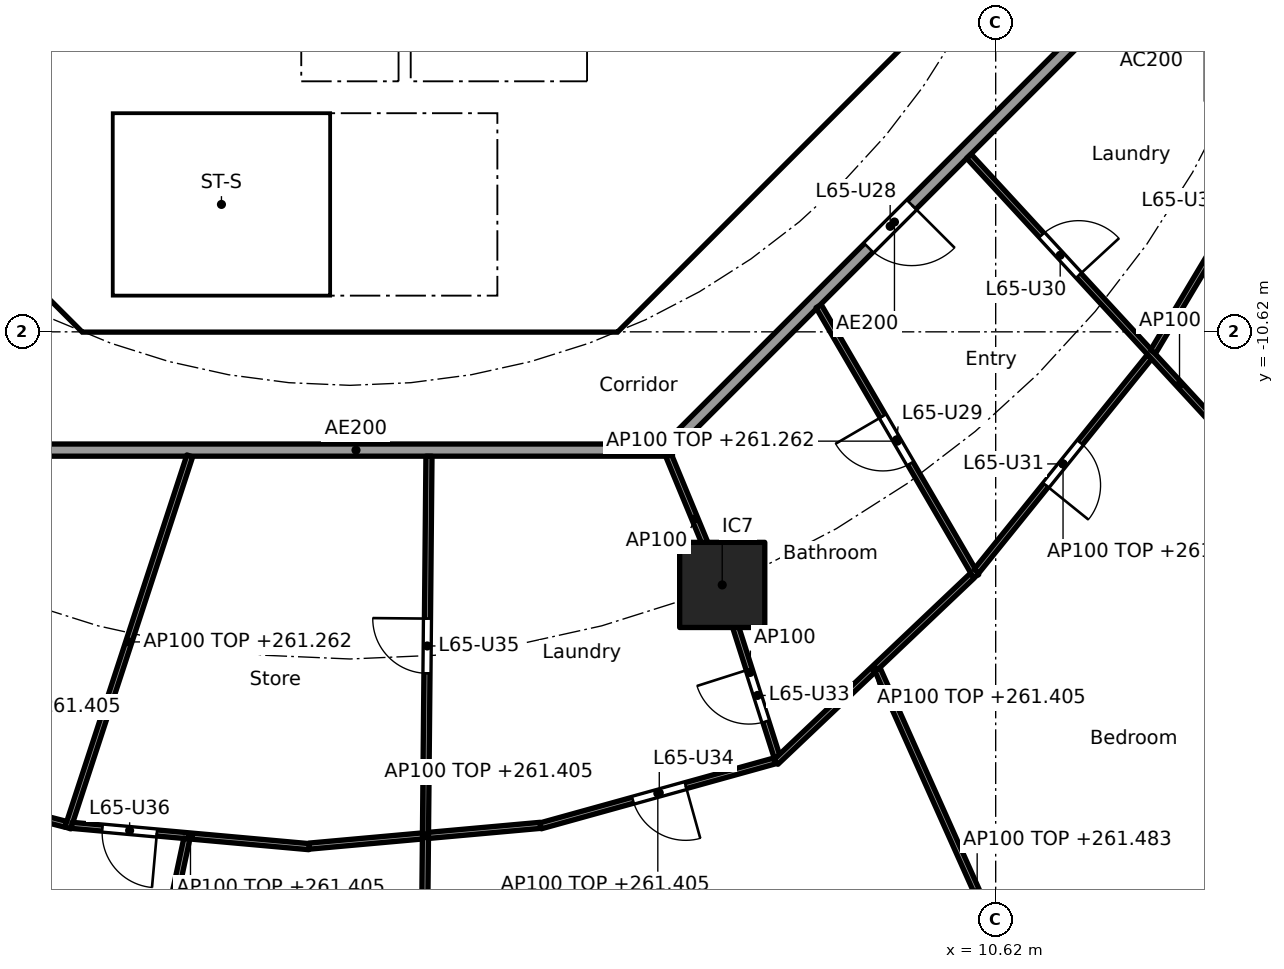
"""IFC4 building model, lengths in metres.
Left out: names, types, materials, properties, quantities, classifications, styles, units other than length and angle.
Written with IfcOpenShell. Run it as: python <this file> out.ifc"""

import sys

from ifc_helpers import new_model, si_unit, direction, frame, frame_2d, origin, origin_2d, place, context, subcontext, project, spatial, polyline, rectangle, outline, extrude, element, fill, save


model = new_model("IFC4")
c1 = context("Model", 3, precision=1e-05, world=origin(), true_north=direction((0.0, 1.0)))
c2 = subcontext(c1, "Body", "Model", "MODEL_VIEW")
j1 = project(units=[si_unit("LENGTHUNIT", "METRE"), si_unit("PLANEANGLEUNIT", "RADIAN")], contexts=[c1])
p1 = place(None, origin())
s1 = spatial("IfcSite", under=j1, at=p1, CompositionType="ELEMENT")
p2 = place(p1, origin())
s2 = spatial("IfcBuilding", under=s1, at=p2, CompositionType="ELEMENT")
p3 = place(p2, frame((0.0, 0.0, 258.5)))
s3 = spatial("IfcBuildingStorey", under=s2, at=p3, CompositionType="ELEMENT", Elevation=258.5)
p4 = place(p3, frame((6.123, -14.782, 0.0), z_axis=(0.0, 0.0, 1.0), x_axis=(1.0, 0.0, 0.0)))
e1 = element("IfcColumn", 1, at=p4, inside=s3, PredefinedType="COLUMN", context=c2, shape_type="SweptSolid", body=[
    extrude(rectangle(XDim=1.4, YDim=1.4, at=origin_2d()), origin(), (0.0, 0.0, 1.0), 3.7),
])
p5 = place(p3, frame((-9.988, -4.613, 0.0), z_axis=(0.0, 0.0, 1.0), x_axis=(0.707106781187, -0.707106781187, 0.0)))
e2 = element("IfcWall", 2, at=p5, inside=s3, PredefinedType="SHEAR", context=c2, shape_type="SweptSolid", body=[
    extrude(rectangle(XDim=7.602, YDim=0.6, at=frame_2d((3.801, 0.0))), origin(), (0.0, 0.0, 1.0), 3.44),
])
p6 = place(p5, frame((6.151, 0.0, 0.0)))
e3 = element("IfcOpeningElement", 3, at=p6, cuts=e2, PredefinedType="OPENING", context=c2, shape_type="SweptSolid", body=[
    extrude(rectangle(XDim=1.1, YDim=2.1, at=frame_2d((0.55, 1.05))), frame((0.0, 0.31, 0.0), z_axis=(0.0, -1.0, 0.0), x_axis=(1.0, 0.0, 0.0)), (0.0, 0.0, 1.0), 0.62),
])
p7 = place(p3, frame((4.613, -9.988, 0.0), z_axis=(0.0, 0.0, 1.0), x_axis=(0.707106781187, 0.707106781187, 0.0)))
e4 = element("IfcWall", 4, at=p7, inside=s3, PredefinedType="SHEAR", context=c2, shape_type="SweptSolid", body=[
    extrude(rectangle(XDim=7.602, YDim=0.6, at=frame_2d((3.801, 0.0))), origin(), (0.0, 0.0, 1.0), 3.44),
])
p8 = place(p7, frame((3.201, 0.0, 0.0)))
e5 = element("IfcOpeningElement", 5, at=p8, cuts=e4, PredefinedType="OPENING", context=c2, shape_type="SweptSolid", body=[
    extrude(rectangle(XDim=1.2, YDim=2.1, at=frame_2d((0.6, 1.05))), frame((0.0, 0.31, 0.0), z_axis=(0.0, -1.0, 0.0), x_axis=(1.0, 0.0, 0.0)), (0.0, 0.0, 1.0), 0.62),
])
p9 = place(p3, frame((4.0, -10.025, 0.0), z_axis=(0.0, 0.0, 1.0), x_axis=(0.0, 1.0, 0.0)))
e6 = element("IfcWall", 6, at=p9, inside=s3, PredefinedType="SOLIDWALL", context=c2, shape_type="SweptSolid", body=[
    extrude(rectangle(XDim=3.0, YDim=0.2, at=frame_2d((1.5, 0.0))), origin(), (0.0, 0.0, 1.0), 3.44),
])
p10 = place(p9, frame((0.975, 0.0, 0.0)))
e7 = element("IfcOpeningElement", 7, at=p10, cuts=e6, PredefinedType="OPENING", context=c2, shape_type="SweptSolid", body=[
    extrude(rectangle(XDim=1.1, YDim=2.1, at=frame_2d((0.55, 1.05))), frame((0.0, 0.11, 0.0), z_axis=(0.0, -1.0, 0.0), x_axis=(1.0, 0.0, 0.0)), (0.0, 0.0, 1.0), 0.22),
])
p11 = place(p3, frame((4.0, -6.5, 0.0), z_axis=(0.0, 0.0, 1.0), x_axis=(0.0, 1.0, 0.0)))
e8 = element("IfcWall", 8, at=p11, inside=s3, PredefinedType="SOLIDWALL", context=c2, shape_type="SweptSolid", body=[
    extrude(rectangle(XDim=2.2, YDim=0.2, at=frame_2d((1.1, 0.0))), origin(), (0.0, 0.0, 1.0), 3.44),
])
p12 = place(p11, frame((0.55, 0.0, 0.0)))
e9 = element("IfcOpeningElement", 9, at=p12, cuts=e8, PredefinedType="OPENING", context=c2, shape_type="SweptSolid", body=[
    extrude(rectangle(XDim=1.1, YDim=2.1, at=frame_2d((0.55, 1.05))), frame((0.0, 0.11, 0.0), z_axis=(0.0, -1.0, 0.0), x_axis=(1.0, 0.0, 0.0)), (0.0, 0.0, 1.0), 0.22),
])
p13 = place(p3, frame((-4.0, -6.5, 0.0), z_axis=(0.0, 0.0, 1.0), x_axis=(0.0, 1.0, 0.0)))
e10 = element("IfcWall", 10, at=p13, inside=s3, PredefinedType="SOLIDWALL", context=c2, shape_type="SweptSolid", body=[
    extrude(rectangle(XDim=2.2, YDim=0.2, at=frame_2d((1.1, 0.0))), origin(), (0.0, 0.0, 1.0), 3.44),
])
p14 = place(p13, frame((0.65, 0.0, 0.0)))
e11 = element("IfcOpeningElement", 11, at=p14, cuts=e10, PredefinedType="OPENING", context=c2, shape_type="SweptSolid", body=[
    extrude(rectangle(XDim=0.9, YDim=2.1, at=frame_2d((0.45, 1.05))), frame((0.0, 0.11, 0.0), z_axis=(0.0, -1.0, 0.0), x_axis=(1.0, 0.0, 0.0)), (0.0, 0.0, 1.0), 0.22),
])
p15 = place(p3, origin())
e12 = element("IfcWall", 12, at=p15, inside=s3, PredefinedType="SHEAR", context=c2, shape_type="SweptSolid", body=[
    extrude(outline(polyline([(-4.152, -10.025), (4.152, -10.025), (4.401, -9.776), (4.825, -10.2), (4.401, -10.625), (-4.401, -10.625), (-4.825, -10.2), (-4.401, -9.776), (-4.152, -10.025)])), origin(), (0.0, 0.0, 1.0), 3.44),
])
for number, where, z_axis, x_axis in (
    (13, (-0.9, -6.5, 0.0), (0.0, 0.0, 1.0), (0.0, 1.0, 0.0)),
    (14, (0.9, -6.5, 0.0), (0.0, 0.0, 1.0), (0.0, 1.0, 0.0)),
):
    element("IfcWall", number, at=place(p3, frame(where, z_axis=z_axis, x_axis=x_axis)), inside=s3, PredefinedType="SOLIDWALL", context=c2, shape_type="SweptSolid", body=[
        extrude(rectangle(XDim=2.2, YDim=0.2, at=frame_2d((1.1, 0.0))), origin(), (0.0, 0.0, 1.0), 3.44),
    ])
p16 = place(p3, origin())
e15 = element("IfcWall", 15, at=p16, inside=s3, PredefinedType="SOLIDWALL", context=c2, shape_type="SweptSolid", body=[
    extrude(outline(polyline([(-3.9, -10.025), (-4.1, -10.025), (-4.1, -7.025), (-3.9, -7.025), (-3.9, -10.025)])), origin(), (0.0, 0.0, 1.0), 3.44),
])
p17 = place(p3, origin())
e16 = element("IfcWall", 16, at=p17, inside=s3, PredefinedType="SOLIDWALL", context=c2, shape_type="SweptSolid", body=[
    extrude(outline(polyline([(4.1, -7.025), (-4.1, -7.025), (-4.1, -6.5), (4.1, -6.5), (4.1, -7.025)])), origin(), (0.0, 0.0, 1.0), 3.44),
])
p18 = place(p3, frame((12.657, -5.243, 0.0), z_axis=(0.0, 0.0, 1.0), x_axis=(0.92383017907, -0.382802560388, 0.0)))
e17 = element("IfcWall", 17, at=p18, inside=s3, PredefinedType="PARTITIONING", context=c2, shape_type="SweptSolid", body=[
    extrude(rectangle(XDim=2.2, YDim=0.2, at=frame_2d((1.1, 0.0))), origin(), (0.0, 0.0, 1.0), 3.44),
])
p19 = place(p3, frame((-5.104, -12.565, 0.0), z_axis=(0.0, 0.0, 1.0), x_axis=(1.0, 0.0, 0.0)))
e18 = element("IfcWall", 18, at=p19, inside=s3, PredefinedType="PARTITIONING", context=c2, shape_type="SweptSolid", body=[
    extrude(rectangle(XDim=10.409, YDim=0.2, at=frame_2d((5.205, 0.0))), origin(), (0.0, 0.0, 1.0), 3.44),
])
p20 = place(p3, frame((5.275, -12.494, 0.0), z_axis=(0.0, 0.0, 1.0), x_axis=(0.707106781187, 0.707106781187, 0.0)))
e19 = element("IfcWall", 19, at=p20, inside=s3, PredefinedType="PARTITIONING", context=c2, shape_type="SweptSolid", body=[
    extrude(rectangle(XDim=10.409, YDim=0.2, at=frame_2d((5.205, 0.0))), origin(), (0.0, 0.0, 1.0), 3.44),
])
p21 = place(p20, frame((4.604, 0.0, 0.0)))
e20 = element("IfcOpeningElement", 20, at=p21, cuts=e19, PredefinedType="OPENING", context=c2, shape_type="SweptSolid", body=[
    extrude(rectangle(XDim=1.0, YDim=2.1, at=frame_2d((0.5, 1.05))), frame((0.0, 0.11, 0.0), z_axis=(0.0, -1.0, 0.0), x_axis=(1.0, 0.0, 0.0)), (0.0, 0.0, 1.0), 0.22),
])
p22 = place(p3, frame((-8.03, -17.854, 0.0), z_axis=(0.0, 0.0, 1.0), x_axis=(0.968441967324, -0.249239154077, 0.0)))
e21 = element("IfcWall", 21, at=p22, inside=s3, PredefinedType="PARTITIONING", context=c2, shape_type="SweptSolid", body=[
    extrude(rectangle(XDim=3.468, YDim=0.1, at=frame_2d((1.734, 0.0))), origin(), (0.0, 0.0, 1.0), 2.905),
])
p23 = place(p22, frame((1.284, 0.0, 0.0)))
e22 = element("IfcOpeningElement", 22, at=p23, cuts=e21, PredefinedType="OPENING", context=c2, shape_type="SweptSolid", body=[
    extrude(rectangle(XDim=0.9, YDim=2.1, at=frame_2d((0.45, 1.05))), frame((0.0, 0.06, 0.0), z_axis=(0.0, -1.0, 0.0), x_axis=(1.0, 0.0, 0.0)), (0.0, 0.0, 1.0), 0.12),
])
p24 = place(p3, frame((-2.633, -12.66, 0.0), z_axis=(0.0, 0.0, 1.0), x_axis=(-0.311435053715, -0.950267439891, 0.0)))
e23 = element("IfcWall", 23, at=p24, inside=s3, PredefinedType="PARTITIONING", context=c2, shape_type="SweptSolid", body=[
    extrude(rectangle(XDim=6.439, YDim=0.1, at=frame_2d((3.22, 0.0))), origin(), (0.0, 0.0, 1.0), 2.762),
])
p25 = place(p3, frame((-4.573, -18.736, 0.0), z_axis=(0.0, 0.0, 1.0), x_axis=(0.995984610732, -0.089524606594, 0.0)))
e24 = element("IfcWall", 24, at=p25, inside=s3, PredefinedType="PARTITIONING", context=c2, shape_type="SweptSolid", body=[
    extrude(rectangle(XDim=3.919, YDim=0.1, at=frame_2d((1.959, 0.0))), origin(), (0.0, 0.0, 1.0), 2.905),
])
p26 = place(p25, frame((0.505, 0.0, 0.0)))
e25 = element("IfcOpeningElement", 25, at=p26, cuts=e24, PredefinedType="OPENING", context=c2, shape_type="SweptSolid", body=[
    extrude(rectangle(XDim=0.9, YDim=2.1, at=frame_2d((0.45, 1.05))), frame((0.0, 0.06, 0.0), z_axis=(0.0, -1.0, 0.0), x_axis=(1.0, 0.0, 0.0)), (0.0, 0.0, 1.0), 0.12),
])
p27 = place(p3, frame((-2.682, -18.955, 0.0), z_axis=(0.0, 0.0, 1.0), x_axis=(-0.209106370979, -0.977892900892, 0.0)))
e26 = element("IfcWall", 26, at=p27, inside=s3, PredefinedType="PARTITIONING", context=c2, shape_type="SweptSolid", body=[
    extrude(rectangle(XDim=9.861, YDim=0.1, at=frame_2d((4.931, 0.0))), origin(), (0.0, 0.0, 1.0), 2.983),
])
p28 = place(p27, frame((4.48, 0.0, 0.0)))
e27 = element("IfcOpeningElement", 27, at=p28, cuts=e26, PredefinedType="OPENING", context=c2, shape_type="SweptSolid", body=[
    extrude(rectangle(XDim=0.9, YDim=2.1, at=frame_2d((0.45, 1.05))), frame((0.0, 0.06, 0.0), z_axis=(0.0, -1.0, 0.0), x_axis=(1.0, 0.0, 0.0)), (0.0, 0.0, 1.0), 0.12),
])
p29 = place(p3, frame((-0.67, -19.077, 0.0), z_axis=(0.0, 0.0, 1.0), x_axis=(0.995986472869, 0.089503887414, 0.0)))
e28 = element("IfcWall", 28, at=p29, inside=s3, PredefinedType="PARTITIONING", context=c2, shape_type="SweptSolid", body=[
    extrude(rectangle(XDim=3.819, YDim=0.1, at=frame_2d((1.909, 0.0))), origin(), (0.0, 0.0, 1.0), 2.905),
])
p30 = place(p3, frame((1.3, -12.665, 0.0), z_axis=(0.0, 0.0, 1.0), x_axis=(-0.009254890166, -0.999957172587, 0.0)))
e29 = element("IfcWall", 29, at=p30, inside=s3, PredefinedType="PARTITIONING", context=c2, shape_type="SweptSolid", body=[
    extrude(rectangle(XDim=15.933, YDim=0.1, at=frame_2d((7.967, 0.0))), origin(), (0.0, 0.0, 1.0), 2.762),
])
p31 = place(p30, frame((2.671, 0.0, 0.0)))
e30 = element("IfcOpeningElement", 30, at=p31, cuts=e29, PredefinedType="OPENING", context=c2, shape_type="SweptSolid", body=[
    extrude(rectangle(XDim=0.9, YDim=2.1, at=frame_2d((0.45, 1.05))), frame((0.0, 0.06, 0.0), z_axis=(0.0, -1.0, 0.0), x_axis=(1.0, 0.0, 0.0)), (0.0, 0.0, 1.0), 0.12),
])
p32 = place(p3, frame((3.135, -18.744, 0.0), z_axis=(0.0, 0.0, 1.0), x_axis=(0.963606111552, 0.267326133738, 0.0)))
e31 = element("IfcWall", 31, at=p32, inside=s3, PredefinedType="PARTITIONING", context=c2, shape_type="SweptSolid", body=[
    extrude(rectangle(XDim=4.003, YDim=0.1, at=frame_2d((2.001, 0.0))), origin(), (0.0, 0.0, 1.0), 2.905),
])
p33 = place(p32, frame((1.576, 0.0, 0.0)))
e32 = element("IfcOpeningElement", 32, at=p33, cuts=e31, PredefinedType="OPENING", context=c2, shape_type="SweptSolid", body=[
    extrude(rectangle(XDim=0.9, YDim=2.1, at=frame_2d((0.45, 1.05))), frame((0.0, 0.06, 0.0), z_axis=(0.0, -1.0, 0.0), x_axis=(1.0, 0.0, 0.0)), (0.0, 0.0, 1.0), 0.12),
])
p34 = place(p3, frame((5.243, -12.657, 0.0), z_axis=(0.0, 0.0, 1.0), x_axis=(0.382719158442, -0.923864733477, 0.0)))
e33 = element("IfcWall", 33, at=p34, inside=s3, PredefinedType="PARTITIONING", context=c2, shape_type="SweptSolid", body=[
    extrude(rectangle(XDim=2.25, YDim=0.1, at=frame_2d((1.125, 0.0))), origin(), (0.0, 0.0, 1.0), 3.44),
])
p35 = place(p3, frame((6.138, -14.83, 0.0), z_axis=(0.0, 0.0, 1.0), x_axis=(0.303665801704, -0.952778610631, 0.0)))
e34 = element("IfcWall", 34, at=p35, inside=s3, PredefinedType="PARTITIONING", context=c2, shape_type="SweptSolid", body=[
    extrude(rectangle(XDim=2.922, YDim=0.1, at=frame_2d((1.461, 0.0))), origin(), (0.0, 0.0, 1.0), 3.44),
])
p36 = place(p35, frame((1.407, 0.0, 0.0)))
e35 = element("IfcOpeningElement", 35, at=p36, cuts=e34, PredefinedType="OPENING", context=c2, shape_type="SweptSolid", body=[
    extrude(rectangle(XDim=0.9, YDim=2.1, at=frame_2d((0.45, 1.05))), frame((0.0, 0.06, 0.0), z_axis=(0.0, -1.0, 0.0), x_axis=(1.0, 0.0, 0.0)), (0.0, 0.0, 1.0), 0.12),
])
p37 = place(p3, frame((7.004, -17.695, 0.0), z_axis=(0.0, 0.0, 1.0), x_axis=(0.725438442765, 0.68828705186, 0.0)))
e36 = element("IfcWall", 36, at=p37, inside=s3, PredefinedType="PARTITIONING", context=c2, shape_type="SweptSolid", body=[
    extrude(rectangle(XDim=4.456, YDim=0.1, at=frame_2d((2.228, 0.0))), origin(), (0.0, 0.0, 1.0), 2.905),
])
p38 = place(p3, frame((8.677, -16.173, 0.0), z_axis=(0.0, 0.0, 1.0), x_axis=(0.408174671437, -0.912903849043, 0.0)))
e37 = element("IfcWall", 37, at=p38, inside=s3, PredefinedType="PARTITIONING", context=c2, shape_type="SweptSolid", body=[
    extrude(rectangle(XDim=8.028, YDim=0.1, at=frame_2d((4.014, 0.0))), origin(), (0.0, 0.0, 1.0), 2.983),
])
p39 = place(p3, frame((7.708, -10.198, 0.0), z_axis=(0.0, 0.0, 1.0), x_axis=(0.503838537732, -0.863797851292, 0.0)))
e38 = element("IfcWall", 38, at=p39, inside=s3, PredefinedType="PARTITIONING", context=c2, shape_type="SweptSolid", body=[
    extrude(rectangle(XDim=5.14, YDim=0.1, at=frame_2d((2.57, 0.0))), origin(), (0.0, 0.0, 1.0), 2.762),
])
p40 = place(p39, frame((2.095, 0.0, 0.0)))
e39 = element("IfcOpeningElement", 39, at=p40, cuts=e38, PredefinedType="OPENING", context=c2, shape_type="SweptSolid", body=[
    extrude(rectangle(XDim=0.9, YDim=2.1, at=frame_2d((0.45, 1.05))), frame((0.0, 0.06, 0.0), z_axis=(0.0, -1.0, 0.0), x_axis=(1.0, 0.0, 0.0)), (0.0, 0.0, 1.0), 0.12),
])
p41 = place(p3, frame((10.304, -14.555, 0.0), z_axis=(0.0, 0.0, 1.0), x_axis=(0.628170338674, 0.778075848237, 0.0)))
e40 = element("IfcWall", 40, at=p41, inside=s3, PredefinedType="PARTITIONING", context=c2, shape_type="SweptSolid", body=[
    extrude(rectangle(XDim=4.532, YDim=0.1, at=frame_2d((2.266, 0.0))), origin(), (0.0, 0.0, 1.0), 2.905),
])
p42 = place(p41, frame((1.816, 0.0, 0.0)))
e41 = element("IfcOpeningElement", 41, at=p42, cuts=e40, PredefinedType="OPENING", context=c2, shape_type="SweptSolid", body=[
    extrude(rectangle(XDim=0.9, YDim=2.1, at=frame_2d((0.45, 1.05))), frame((0.0, 0.06, 0.0), z_axis=(0.0, -1.0, 0.0), x_axis=(1.0, 0.0, 0.0)), (0.0, 0.0, 1.0), 0.12),
])
p43 = place(p3, frame((10.179, -7.731, 0.0), z_axis=(0.0, 0.0, 1.0), x_axis=(0.67775318564, -0.73528947997, 0.0)))
e42 = element("IfcWall", 42, at=p43, inside=s3, PredefinedType="PARTITIONING", context=c2, shape_type="SweptSolid", body=[
    extrude(rectangle(XDim=10.222, YDim=0.1, at=frame_2d((5.111, 0.0))), origin(), (0.0, 0.0, 1.0), 2.762),
])
p44 = place(p43, frame((1.766, 0.0, 0.0)))
e43 = element("IfcOpeningElement", 43, at=p44, cuts=e42, PredefinedType="OPENING", context=c2, shape_type="SweptSolid", body=[
    extrude(rectangle(XDim=0.9, YDim=2.1, at=frame_2d((0.45, 1.05))), frame((0.0, 0.06, 0.0), z_axis=(0.0, -1.0, 0.0), x_axis=(1.0, 0.0, 0.0)), (0.0, 0.0, 1.0), 0.12),
])
p45 = place(p3, frame((13.208, -10.947, 0.0), z_axis=(0.0, 0.0, 1.0), x_axis=(0.512726452516, 0.858552028063, 0.0)))
e44 = element("IfcWall", 44, at=p45, inside=s3, PredefinedType="PARTITIONING", context=c2, shape_type="SweptSolid", body=[
    extrude(rectangle(XDim=4.772, YDim=0.1, at=frame_2d((2.386, 0.0))), origin(), (0.0, 0.0, 1.0), 2.905),
])
p46 = place(p45, frame((1.936, 0.0, 0.0)))
e45 = element("IfcOpeningElement", 45, at=p46, cuts=e44, PredefinedType="OPENING", context=c2, shape_type="SweptSolid", body=[
    extrude(rectangle(XDim=0.9, YDim=2.1, at=frame_2d((0.45, 1.05))), frame((0.0, 0.06, 0.0), z_axis=(0.0, -1.0, 0.0), x_axis=(1.0, 0.0, 0.0)), (0.0, 0.0, 1.0), 0.12),
])
p47 = place(p10, origin())
e46 = element("IfcDoor", 46, at=p47, inside=s3, OperationType="SINGLE_SWING_LEFT", PredefinedType="DOOR", context=c2, shape_type="SweptSolid", body=[
    extrude(rectangle(XDim=1.1, YDim=2.1, at=frame_2d((0.55, 1.05))), frame((0.0, 0.025, 0.0), z_axis=(0.0, -1.0, 0.0), x_axis=(1.0, 0.0, 0.0)), (0.0, 0.0, 1.0), 0.05),
])
fill(e7, e46)
p48 = place(p8, origin())
e47 = element("IfcDoor", 47, at=p48, inside=s3, OperationType="SINGLE_SWING_LEFT", PredefinedType="DOOR", context=c2, shape_type="SweptSolid", body=[
    extrude(rectangle(XDim=1.2, YDim=2.1, at=frame_2d((0.6, 1.05))), frame((0.0, 0.025, 0.0), z_axis=(0.0, -1.0, 0.0), x_axis=(1.0, 0.0, 0.0)), (0.0, 0.0, 1.0), 0.05),
])
fill(e5, e47)
p49 = place(p6, origin())
e48 = element("IfcDoor", 48, at=p49, inside=s3, OperationType="SINGLE_SWING_LEFT", PredefinedType="DOOR", context=c2, shape_type="SweptSolid", body=[
    extrude(rectangle(XDim=1.1, YDim=2.1, at=frame_2d((0.55, 1.05))), frame((0.0, 0.025, 0.0), z_axis=(0.0, -1.0, 0.0), x_axis=(1.0, 0.0, 0.0)), (0.0, 0.0, 1.0), 0.05),
])
fill(e3, e48)
p50 = place(p21, frame((1.0, 0.0, 0.0), x_axis=(-1.0, 0.0, 0.0)))
e49 = element("IfcDoor", 49, at=p50, inside=s3, OperationType="SINGLE_SWING_LEFT", PredefinedType="DOOR", context=c2, shape_type="SweptSolid", body=[
    extrude(rectangle(XDim=1.0, YDim=2.1, at=frame_2d((0.5, 1.05))), frame((0.0, 0.025, 0.0), z_axis=(0.0, -1.0, 0.0), x_axis=(1.0, 0.0, 0.0)), (0.0, 0.0, 1.0), 0.05),
])
fill(e20, e49)
p51 = place(p40, frame((0.9, 0.0, 0.0), x_axis=(-1.0, 0.0, 0.0)))
e50 = element("IfcDoor", 50, at=p51, inside=s3, OperationType="SINGLE_SWING_RIGHT", PredefinedType="DOOR", context=c2, shape_type="SweptSolid", body=[
    extrude(rectangle(XDim=0.9, YDim=2.1, at=frame_2d((0.45, 1.05))), frame((0.0, 0.025, 0.0), z_axis=(0.0, -1.0, 0.0), x_axis=(1.0, 0.0, 0.0)), (0.0, 0.0, 1.0), 0.05),
])
fill(e39, e50)
p52 = place(p44, origin())
e51 = element("IfcDoor", 51, at=p52, inside=s3, OperationType="SINGLE_SWING_RIGHT", PredefinedType="DOOR", context=c2, shape_type="SweptSolid", body=[
    extrude(rectangle(XDim=0.9, YDim=2.1, at=frame_2d((0.45, 1.05))), frame((0.0, 0.025, 0.0), z_axis=(0.0, -1.0, 0.0), x_axis=(1.0, 0.0, 0.0)), (0.0, 0.0, 1.0), 0.05),
])
fill(e43, e51)
p53 = place(p42, frame((0.9, 0.0, 0.0), x_axis=(-1.0, 0.0, 0.0)))
e52 = element("IfcDoor", 52, at=p53, inside=s3, OperationType="SINGLE_SWING_RIGHT", PredefinedType="DOOR", context=c2, shape_type="SweptSolid", body=[
    extrude(rectangle(XDim=0.9, YDim=2.1, at=frame_2d((0.45, 1.05))), frame((0.0, 0.025, 0.0), z_axis=(0.0, -1.0, 0.0), x_axis=(1.0, 0.0, 0.0)), (0.0, 0.0, 1.0), 0.05),
])
fill(e41, e52)
p54 = place(p36, frame((0.9, 0.0, 0.0), x_axis=(-1.0, 0.0, 0.0)))
e53 = element("IfcDoor", 53, at=p54, inside=s3, OperationType="SINGLE_SWING_RIGHT", PredefinedType="DOOR", context=c2, shape_type="SweptSolid", body=[
    extrude(rectangle(XDim=0.9, YDim=2.1, at=frame_2d((0.45, 1.05))), frame((0.0, 0.025, 0.0), z_axis=(0.0, -1.0, 0.0), x_axis=(1.0, 0.0, 0.0)), (0.0, 0.0, 1.0), 0.05),
])
fill(e35, e53)
p55 = place(p33, frame((0.9, 0.0, 0.0), x_axis=(-1.0, 0.0, 0.0)))
e54 = element("IfcDoor", 54, at=p55, inside=s3, OperationType="SINGLE_SWING_LEFT", PredefinedType="DOOR", context=c2, shape_type="SweptSolid", body=[
    extrude(rectangle(XDim=0.9, YDim=2.1, at=frame_2d((0.45, 1.05))), frame((0.0, 0.025, 0.0), z_axis=(0.0, -1.0, 0.0), x_axis=(1.0, 0.0, 0.0)), (0.0, 0.0, 1.0), 0.05),
])
fill(e32, e54)
p56 = place(p31, frame((0.9, 0.0, 0.0), x_axis=(-1.0, 0.0, 0.0)))
e55 = element("IfcDoor", 55, at=p56, inside=s3, OperationType="SINGLE_SWING_RIGHT", PredefinedType="DOOR", context=c2, shape_type="SweptSolid", body=[
    extrude(rectangle(XDim=0.9, YDim=2.1, at=frame_2d((0.45, 1.05))), frame((0.0, 0.025, 0.0), z_axis=(0.0, -1.0, 0.0), x_axis=(1.0, 0.0, 0.0)), (0.0, 0.0, 1.0), 0.05),
])
fill(e30, e55)
p57 = place(p26, frame((0.9, 0.0, 0.0), x_axis=(-1.0, 0.0, 0.0)))
e56 = element("IfcDoor", 56, at=p57, inside=s3, OperationType="SINGLE_SWING_LEFT", PredefinedType="DOOR", context=c2, shape_type="SweptSolid", body=[
    extrude(rectangle(XDim=0.9, YDim=2.1, at=frame_2d((0.45, 1.05))), frame((0.0, 0.025, 0.0), z_axis=(0.0, -1.0, 0.0), x_axis=(1.0, 0.0, 0.0)), (0.0, 0.0, 1.0), 0.05),
])
fill(e25, e56)
save(model, sys.argv[1])
